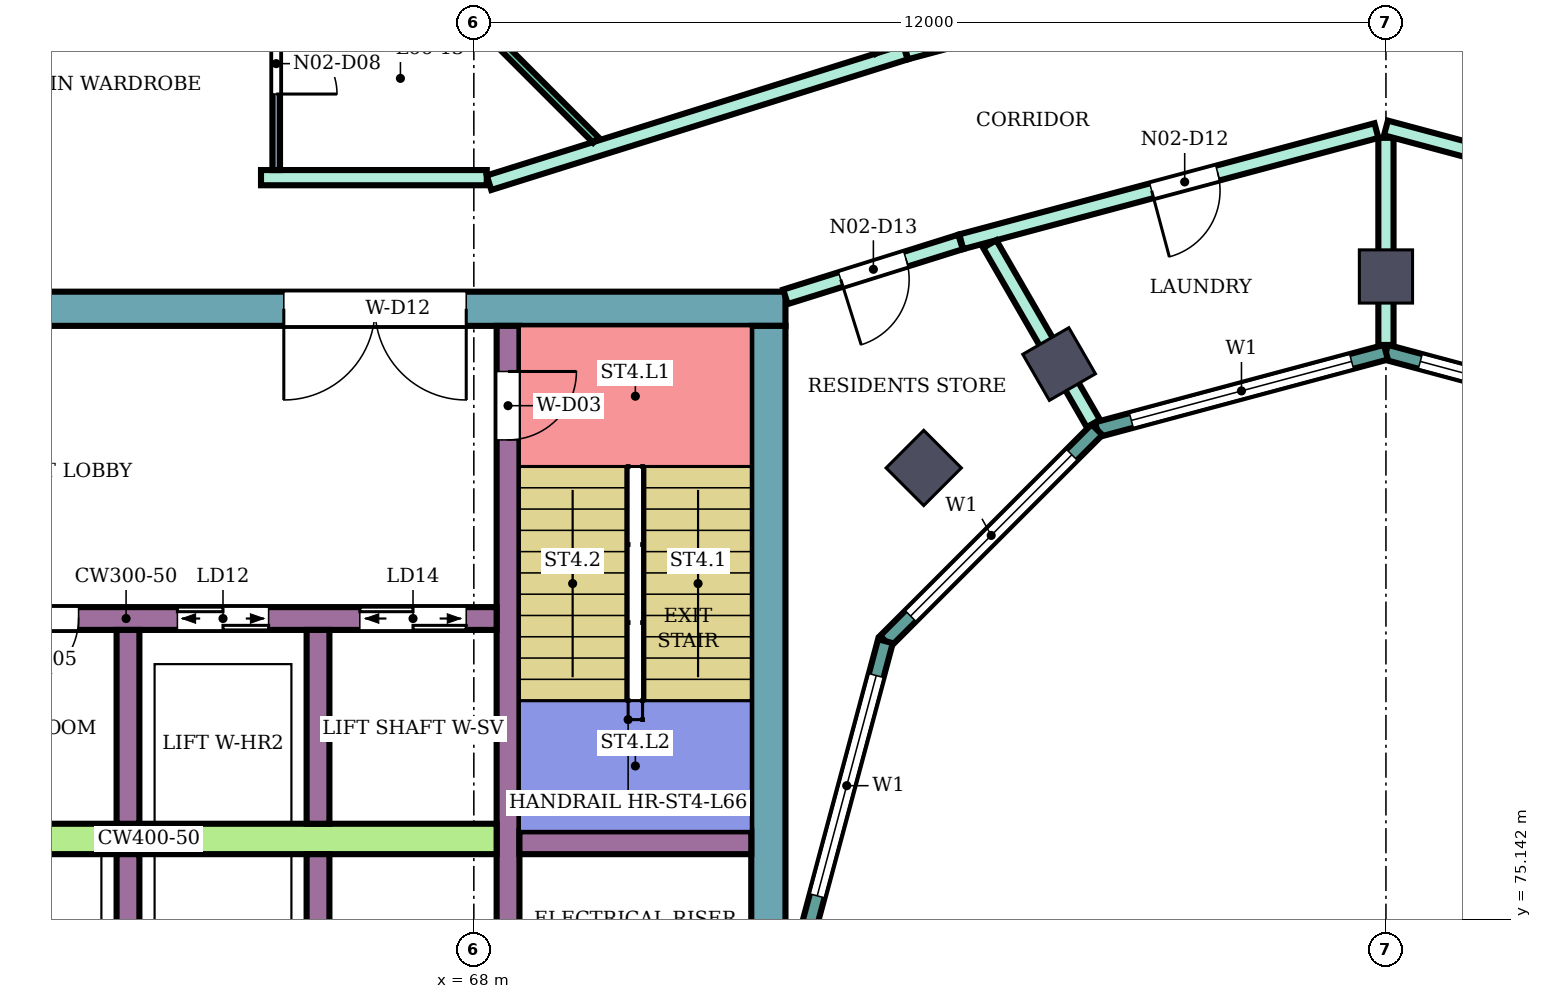
"""IFC4 building model, lengths in metres.
Left out: names, types, materials, properties, quantities, classifications, styles, units other than length and angle.
Written with IfcOpenShell. Run it as: python <this file> out.ifc"""

import sys

from ifc_helpers import new_model, si_unit, direction, frame, frame_2d, origin, origin_2d, place, context, subcontext, project, spatial, rectangle, extrude, element, fill, save


model = new_model("IFC4")
c1 = context("Model", 3, precision=1e-05, world=origin(), true_north=direction((0.0, 1.0)))
c2 = subcontext(c1, "Body", "Model", "MODEL_VIEW")
j1 = project(units=[si_unit("LENGTHUNIT", "METRE"), si_unit("PLANEANGLEUNIT", "RADIAN")], contexts=[c1])
p1 = place(None, origin())
s1 = spatial("IfcSite", under=j1, at=p1, CompositionType="ELEMENT")
p2 = place(p1, origin())
s2 = spatial("IfcBuilding", under=s1, at=p2, CompositionType="ELEMENT")
p3 = place(p2, frame((0.0, 0.0, 288.3)))
s3 = spatial("IfcBuildingStorey", under=s2, at=p3, CompositionType="ELEMENT", Elevation=288.3)
for number, where, z_axis, x_axis in (
    (1, (80.0, 83.6, 0.0), (0.0, 0.0, 1.0), (0.0, 1.0, 0.0)),
    (2, (75.7, 82.448, 0.0), (0.0, 0.0, 1.0), (-0.5, 0.866, 0.0)),
    (3, (73.919, 81.081, 0.0), (0.0, 0.0, 1.0), (-0.707, 0.707, 0.0)),
):
    element("IfcColumn", number, at=place(p3, frame(where, z_axis=z_axis, x_axis=x_axis)), inside=s3, PredefinedType="COLUMN", context=c2, shape_type="SweptSolid", body=[
        extrude(rectangle(XDim=0.7, YDim=0.7, at=origin_2d()), origin(), (0.0, 0.0, 1.0), 4.2),
    ])
p4 = place(p3, frame((72.1, 83.175, 0.0), z_axis=(0.0, 0.0, 1.0), x_axis=(-1.0, 0.0, 0.0)))
e4 = element("IfcWall", 4, at=p4, inside=s3, PredefinedType="SHEAR", context=c2, shape_type="SweptSolid", body=[
    extrude(rectangle(XDim=13.55, YDim=0.45, at=frame_2d((6.775, 0.0))), origin(), (0.0, 0.0, 1.0), 3.88),
])
p5 = place(p4, frame((4.2, 0.0, 0.0)))
e5 = element("IfcOpeningElement", 5, at=p5, cuts=e4, PredefinedType="OPENING", context=c2, shape_type="SweptSolid", body=[
    extrude(rectangle(XDim=2.4, YDim=2.4, at=frame_2d((1.2, 1.2))), frame((0.0, 0.235, 0.0), z_axis=(0.0, -1.0, 0.0), x_axis=(1.0, 0.0, 0.0)), (0.0, 0.0, 1.0), 0.47),
])
p6 = place(p3, frame((71.875, 82.95, 0.0), z_axis=(0.0, 0.0, 1.0), x_axis=(0.0, -1.0, 0.0)))
e6 = element("IfcWall", 6, at=p6, inside=s3, PredefinedType="SHEAR", context=c2, shape_type="SweptSolid", body=[
    extrude(rectangle(XDim=7.95, YDim=0.45, at=frame_2d((3.975, 0.0))), origin(), (0.0, 0.0, 1.0), 3.88),
])
p7 = place(p3, frame((68.45, 82.95, 0.0), z_axis=(0.0, 0.0, 1.0), x_axis=(0.0, -1.0, 0.0)))
e7 = element("IfcWall", 7, at=p7, inside=s3, PredefinedType="SHEAR", context=c2, shape_type="SweptSolid", body=[
    extrude(rectangle(XDim=7.95, YDim=0.3, at=frame_2d((3.975, 0.0))), origin(), (0.0, 0.0, 1.0), 3.88),
])
p8 = place(p7, frame((0.6, 0.0, 0.0)))
e8 = element("IfcOpeningElement", 8, at=p8, cuts=e7, PredefinedType="OPENING", context=c2, shape_type="SweptSolid", body=[
    extrude(rectangle(XDim=0.9, YDim=2.1, at=frame_2d((0.45, 1.05))), frame((0.0, 0.16, 0.0), z_axis=(0.0, -1.0, 0.0), x_axis=(1.0, 0.0, 0.0)), (0.0, 0.0, 1.0), 0.32),
])
p9 = place(p3, frame((71.65, 76.15, 0.0), z_axis=(0.0, 0.0, 1.0), x_axis=(-1.0, 0.0, 0.0)))
e9 = element("IfcWall", 9, at=p9, inside=s3, PredefinedType="SHEAR", context=c2, shape_type="SweptSolid", body=[
    extrude(rectangle(XDim=3.05, YDim=0.3, at=frame_2d((1.525, 0.0))), origin(), (0.0, 0.0, 1.0), 3.88),
])
p10 = place(p3, frame((68.3, 76.2, 0.0), z_axis=(0.0, 0.0, 1.0), x_axis=(-1.0, 0.0, 0.0)))
e10 = element("IfcWall", 10, at=p10, inside=s3, PredefinedType="SHEAR", context=c2, shape_type="SweptSolid", body=[
    extrude(rectangle(XDim=9.75, YDim=0.4, at=frame_2d((4.875, 0.0))), origin(), (0.0, 0.0, 1.0), 3.88),
])
p11 = place(p3, frame((68.3, 79.1, 0.0), z_axis=(0.0, 0.0, 1.0), x_axis=(-1.0, 0.0, 0.0)))
e11 = element("IfcWall", 11, at=p11, inside=s3, PredefinedType="SHEAR", context=c2, shape_type="SweptSolid", body=[
    extrude(rectangle(XDim=9.75, YDim=0.3, at=frame_2d((4.875, 0.0))), origin(), (0.0, 0.0, 1.0), 3.88),
])
p12 = place(p11, frame((0.4, 0.0, 0.0)))
e12 = element("IfcOpeningElement", 12, at=p12, cuts=e11, PredefinedType="OPENING", context=c2, shape_type="SweptSolid", body=[
    extrude(rectangle(XDim=1.4, YDim=2.1, at=frame_2d((0.7, 1.05))), frame((0.0, 0.16, 0.0), z_axis=(0.0, -1.0, 0.0), x_axis=(1.0, 0.0, 0.0)), (0.0, 0.0, 1.0), 0.32),
])
p13 = place(p11, frame((3.0, 0.0, 0.0)))
e13 = element("IfcOpeningElement", 13, at=p13, cuts=e11, PredefinedType="OPENING", context=c2, shape_type="SweptSolid", body=[
    extrude(rectangle(XDim=1.2, YDim=2.1, at=frame_2d((0.6, 1.05))), frame((0.0, 0.16, 0.0), z_axis=(0.0, -1.0, 0.0), x_axis=(1.0, 0.0, 0.0)), (0.0, 0.0, 1.0), 0.32),
])
p14 = place(p11, frame((5.5, 0.0, 0.0)))
e14 = element("IfcOpeningElement", 14, at=p14, cuts=e11, PredefinedType="OPENING", context=c2, shape_type="SweptSolid", body=[
    extrude(rectangle(XDim=0.9, YDim=2.1, at=frame_2d((0.45, 1.05))), frame((0.0, 0.16, 0.0), z_axis=(0.0, -1.0, 0.0), x_axis=(1.0, 0.0, 0.0)), (0.0, 0.0, 1.0), 0.32),
])
p15 = place(p11, frame((7.875, 0.0, 0.0)))
e15 = element("IfcOpeningElement", 15, at=p15, cuts=e11, PredefinedType="OPENING", context=c2, shape_type="SweptSolid", body=[
    extrude(rectangle(XDim=0.9, YDim=2.1, at=frame_2d((0.45, 1.05))), frame((0.0, 0.16, 0.0), z_axis=(0.0, -1.0, 0.0), x_axis=(1.0, 0.0, 0.0)), (0.0, 0.0, 1.0), 0.32),
])
for number, where, z_axis, x_axis in (
    (16, (65.95, 76.0, 0.0), (0.0, 0.0, 1.0), (0.0, -1.0, 0.0)),
    (17, (63.45, 76.0, 0.0), (0.0, 0.0, 1.0), (0.0, -1.0, 0.0)),
    (18, (65.95, 78.95, 0.0), (0.0, 0.0, 1.0), (0.0, -1.0, 0.0)),
    (19, (63.45, 78.95, 0.0), (0.0, 0.0, 1.0), (0.0, -1.0, 0.0)),
):
    element("IfcWall", number, at=place(p3, frame(where, z_axis=z_axis, x_axis=x_axis)), inside=s3, PredefinedType="SHEAR", context=c2, shape_type="SweptSolid", body=[
        extrude(rectangle(XDim=2.55, YDim=0.3, at=frame_2d((1.275, 0.0))), origin(), (0.0, 0.0, 1.0), 3.88),
    ])
p16 = place(p3, frame((83.802, 81.585, 0.0), z_axis=(0.0, 0.0, 1.0), x_axis=(-0.965933654434, 0.258789828301, 0.0)))
e20 = element("IfcWall", 20, at=p16, inside=s3, PredefinedType="NOTDEFINED", context=c2, shape_type="SweptSolid", body=[
    extrude(rectangle(XDim=3.936, YDim=0.2, at=frame_2d((1.968, 0.0))), origin(), (0.0, 0.0, 1.0), 4.2),
])
p17 = place(p16, frame((0.468, 0.0, 0.9)))
e21 = element("IfcOpeningElement", 21, at=p17, cuts=e20, PredefinedType="OPENING", context=c2, shape_type="SweptSolid", body=[
    extrude(rectangle(XDim=3.0, YDim=2.3, at=frame_2d((1.5, 1.15))), frame((0.0, 0.11, 0.0), z_axis=(0.0, -1.0, 0.0), x_axis=(1.0, 0.0, 0.0)), (0.0, 0.0, 1.0), 0.22),
])
p18 = place(p3, frame((80.0, 82.604, 0.0), z_axis=(0.0, 0.0, 1.0), x_axis=(-0.965933654434, -0.258789828301, 0.0)))
e22 = element("IfcWall", 22, at=p18, inside=s3, PredefinedType="NOTDEFINED", context=c2, shape_type="SweptSolid", body=[
    extrude(rectangle(XDim=3.936, YDim=0.2, at=frame_2d((1.968, 0.0))), origin(), (0.0, 0.0, 1.0), 4.2),
])
p19 = place(p18, frame((0.468, 0.0, 0.9)))
e23 = element("IfcOpeningElement", 23, at=p19, cuts=e22, PredefinedType="OPENING", context=c2, shape_type="SweptSolid", body=[
    extrude(rectangle(XDim=3.0, YDim=2.3, at=frame_2d((1.5, 1.15))), frame((0.0, 0.11, 0.0), z_axis=(0.0, -1.0, 0.0), x_axis=(1.0, 0.0, 0.0)), (0.0, 0.0, 1.0), 0.22),
])
p20 = place(p3, frame((76.198, 81.585, 0.0), z_axis=(0.0, 0.0, 1.0), x_axis=(-0.707106781187, -0.707106781187, 0.0)))
e24 = element("IfcWall", 24, at=p20, inside=s3, PredefinedType="NOTDEFINED", context=c2, shape_type="SweptSolid", body=[
    extrude(rectangle(XDim=3.936, YDim=0.2, at=frame_2d((1.968, 0.0))), origin(), (0.0, 0.0, 1.0), 4.2),
])
p21 = place(p20, frame((0.468, 0.0, 0.9)))
e25 = element("IfcOpeningElement", 25, at=p21, cuts=e24, PredefinedType="OPENING", context=c2, shape_type="SweptSolid", body=[
    extrude(rectangle(XDim=3.0, YDim=2.3, at=frame_2d((1.5, 1.15))), frame((0.0, 0.11, 0.0), z_axis=(0.0, -1.0, 0.0), x_axis=(1.0, 0.0, 0.0)), (0.0, 0.0, 1.0), 0.22),
])
p22 = place(p3, frame((73.415, 78.802, 0.0), z_axis=(0.0, 0.0, 1.0), x_axis=(-0.258789828301, -0.965933654434, 0.0)))
e26 = element("IfcWall", 26, at=p22, inside=s3, PredefinedType="NOTDEFINED", context=c2, shape_type="SweptSolid", body=[
    extrude(rectangle(XDim=3.936, YDim=0.2, at=frame_2d((1.968, 0.0))), origin(), (0.0, 0.0, 1.0), 4.2),
])
p23 = place(p22, frame((0.468, 0.0, 0.9)))
e27 = element("IfcOpeningElement", 27, at=p23, cuts=e26, PredefinedType="OPENING", context=c2, shape_type="SweptSolid", body=[
    extrude(rectangle(XDim=3.0, YDim=2.3, at=frame_2d((1.5, 1.15))), frame((0.0, 0.11, 0.0), z_axis=(0.0, -1.0, 0.0), x_axis=(1.0, 0.0, 0.0)), (0.0, 0.0, 1.0), 0.22),
])
p24 = place(p3, frame((65.2, 84.9, 0.0), z_axis=(0.0, 0.0, 1.0), x_axis=(1.0, 0.0, 0.0)))
e28 = element("IfcWall", 28, at=p24, inside=s3, PredefinedType="PARTITIONING", context=c2, shape_type="SweptSolid", body=[
    extrude(rectangle(XDim=2.97, YDim=0.2, at=frame_2d((1.485, 0.0))), origin(), (0.0, 0.0, 1.0), 3.75),
])
p25 = place(p3, frame((68.2, 84.833, 0.0), z_axis=(0.0, 0.0, 1.0), x_axis=(0.954191968402, 0.299195065863, 0.0)))
e29 = element("IfcWall", 29, at=p25, inside=s3, PredefinedType="PARTITIONING", context=c2, shape_type="SweptSolid", body=[
    extrude(rectangle(XDim=5.74, YDim=0.2, at=frame_2d((2.87, 0.0))), origin(), (0.0, 0.0, 1.0), 3.75),
])
p26 = place(p3, frame((72.1, 83.332, 0.0), z_axis=(0.0, 0.0, 1.0), x_axis=(0.954233106619, 0.299063836383, 0.0)))
e30 = element("IfcWall", 30, at=p26, inside=s3, PredefinedType="PARTITIONING", context=c2, shape_type="SweptSolid", body=[
    extrude(rectangle(XDim=2.414, YDim=0.2, at=frame_2d((1.207, 0.0))), origin(), (0.0, 0.0, 1.0), 3.75),
])
p27 = place(p26, frame((0.762, 0.0, 0.0)))
e31 = element("IfcOpeningElement", 31, at=p27, cuts=e30, PredefinedType="OPENING", context=c2, shape_type="SweptSolid", body=[
    extrude(rectangle(XDim=0.9, YDim=2.1, at=frame_2d((0.45, 1.05))), frame((0.0, 0.11, 0.0), z_axis=(0.0, -1.0, 0.0), x_axis=(1.0, 0.0, 0.0)), (0.0, 0.0, 1.0), 0.22),
])
p28 = place(p3, frame((73.687, 86.554, 0.0), z_axis=(0.0, 0.0, 1.0), x_axis=(0.96595903825, 0.258695064551, 0.0)))
e32 = element("IfcWall", 32, at=p28, inside=s3, PredefinedType="PARTITIONING", context=c2, shape_type="SweptSolid", body=[
    extrude(rectangle(XDim=6.446, YDim=0.2, at=frame_2d((3.223, 0.0))), origin(), (0.0, 0.0, 1.0), 3.75),
])
p29 = place(p28, frame((4.986, 0.0, 0.0)))
e33 = element("IfcOpeningElement", 33, at=p29, cuts=e32, PredefinedType="OPENING", context=c2, shape_type="SweptSolid", body=[
    extrude(rectangle(XDim=1.0, YDim=2.1, at=frame_2d((0.5, 1.05))), frame((0.0, 0.11, 0.0), z_axis=(0.0, -1.0, 0.0), x_axis=(1.0, 0.0, 0.0)), (0.0, 0.0, 1.0), 0.22),
])
p30 = place(p3, frame((74.413, 84.057, 0.0), z_axis=(0.0, 0.0, 1.0), x_axis=(0.965972135939, 0.258646153246, 0.0)))
e34 = element("IfcWall", 34, at=p30, inside=s3, PredefinedType="PARTITIONING", context=c2, shape_type="SweptSolid", body=[
    extrude(rectangle(XDim=5.654, YDim=0.2, at=frame_2d((2.827, 0.0))), origin(), (0.0, 0.0, 1.0), 3.75),
])
p31 = place(p30, frame((2.593, 0.0, 0.0)))
e35 = element("IfcOpeningElement", 35, at=p31, cuts=e34, PredefinedType="OPENING", context=c2, shape_type="SweptSolid", body=[
    extrude(rectangle(XDim=0.9, YDim=2.1, at=frame_2d((0.45, 1.05))), frame((0.0, 0.11, 0.0), z_axis=(0.0, -1.0, 0.0), x_axis=(1.0, 0.0, 0.0)), (0.0, 0.0, 1.0), 0.22),
])
p32 = place(p3, frame((74.787, 84.027, 0.0), z_axis=(0.0, 0.0, 1.0), x_axis=(0.500079107518, -0.86597972622, 0.0)))
e36 = element("IfcWall", 36, at=p32, inside=s3, PredefinedType="PARTITIONING", context=c2, shape_type="SweptSolid", body=[
    extrude(rectangle(XDim=2.726, YDim=0.2, at=frame_2d((1.363, 0.0))), origin(), (0.0, 0.0, 1.0), 3.75),
])
p33 = place(p3, frame((80.0, 82.699, 0.0), z_axis=(0.0, 0.0, 1.0), x_axis=(0.0, 1.0, 0.0)))
e37 = element("IfcWall", 37, at=p33, inside=s3, PredefinedType="PARTITIONING", context=c2, shape_type="SweptSolid", body=[
    extrude(rectangle(XDim=2.725, YDim=0.2, at=frame_2d((1.363, 0.0))), origin(), (0.0, 0.0, 1.0), 3.75),
])
p34 = place(p3, frame((80.0, 85.554, 0.0), z_axis=(0.0, 0.0, 1.0), x_axis=(0.965928989968, -0.258807237802, 0.0)))
e38 = element("IfcWall", 38, at=p34, inside=s3, PredefinedType="PARTITIONING", context=c2, shape_type="SweptSolid", body=[
    extrude(rectangle(XDim=5.774, YDim=0.2, at=frame_2d((2.887, 0.0))), origin(), (0.0, 0.0, 1.0), 3.75),
])
p35 = place(p34, frame((2.292, 0.0, 0.0)))
e39 = element("IfcOpeningElement", 39, at=p35, cuts=e38, PredefinedType="OPENING", context=c2, shape_type="SweptSolid", body=[
    extrude(rectangle(XDim=0.9, YDim=2.1, at=frame_2d((0.45, 1.05))), frame((0.0, 0.11, 0.0), z_axis=(0.0, -1.0, 0.0), x_axis=(1.0, 0.0, 0.0)), (0.0, 0.0, 1.0), 0.22),
])
p36 = place(p3, frame((80.087, 88.223, 0.0), z_axis=(0.0, 0.0, 1.0), x_axis=(0.965852330757, -0.25909317855, 0.0)))
e40 = element("IfcWall", 40, at=p36, inside=s3, PredefinedType="PARTITIONING", context=c2, shape_type="SweptSolid", body=[
    extrude(rectangle(XDim=6.436, YDim=0.2, at=frame_2d((3.218, 0.0))), origin(), (0.0, 0.0, 1.0), 3.75),
])
p37 = place(p36, frame((2.678, 0.0, 0.0)))
e41 = element("IfcOpeningElement", 41, at=p37, cuts=e40, PredefinedType="OPENING", context=c2, shape_type="SweptSolid", body=[
    extrude(rectangle(XDim=1.0, YDim=2.1, at=frame_2d((0.5, 1.05))), frame((0.0, 0.11, 0.0), z_axis=(0.0, -1.0, 0.0), x_axis=(1.0, 0.0, 0.0)), (0.0, 0.0, 1.0), 0.22),
])
p38 = place(p3, frame((64.656, 90.344, 0.0), z_axis=(0.0, 0.0, 1.0), x_axis=(0.707106781187, -0.707106781187, 0.0)))
e42 = element("IfcWall", 42, at=p38, inside=s3, PredefinedType="PARTITIONING", context=c2, shape_type="SweptSolid", body=[
    extrude(rectangle(XDim=7.0, YDim=0.1, at=frame_2d((3.5, 0.0))), origin(), (0.0, 0.0, 1.0), 2.48),
])
p39 = place(p38, frame((1.613, 0.0, 0.0)))
e43 = element("IfcOpeningElement", 43, at=p39, cuts=e42, PredefinedType="OPENING", context=c2, shape_type="SweptSolid", body=[
    extrude(rectangle(XDim=0.9, YDim=2.1, at=frame_2d((0.45, 1.05))), frame((0.0, 0.06, 0.0), z_axis=(0.0, -1.0, 0.0), x_axis=(1.0, 0.0, 0.0)), (0.0, 0.0, 1.0), 0.12),
])
p40 = place(p3, frame((65.4, 85.0, 0.0), z_axis=(0.0, 0.0, 1.0), x_axis=(0.0, 1.0, 0.0)))
e44 = element("IfcWall", 44, at=p40, inside=s3, PredefinedType="PARTITIONING", context=c2, shape_type="SweptSolid", body=[
    extrude(rectangle(XDim=2.85, YDim=0.1, at=frame_2d((1.425, 0.0))), origin(), (0.0, 0.0, 1.0), 3.75),
])
p41 = place(p40, frame((1.0, 0.0, 0.0)))
e45 = element("IfcOpeningElement", 45, at=p41, cuts=e44, PredefinedType="OPENING", context=c2, shape_type="SweptSolid", body=[
    extrude(rectangle(XDim=0.8, YDim=2.1, at=frame_2d((0.4, 1.05))), frame((0.0, 0.06, 0.0), z_axis=(0.0, -1.0, 0.0), x_axis=(1.0, 0.0, 0.0)), (0.0, 0.0, 1.0), 0.12),
])
p42 = place(p3, frame((67.851, 96.042, 0.0), z_axis=(0.0, 0.0, 1.0), x_axis=(0.499990581918, -0.866030841248, 0.0)))
e46 = element("IfcWall", 46, at=p42, inside=s3, PredefinedType="PARTITIONING", context=c2, shape_type="SweptSolid", body=[
    extrude(rectangle(XDim=10.956, YDim=0.1, at=frame_2d((5.478, 0.0))), origin(), (0.0, 0.0, 1.0), 2.48),
])
p43 = place(p42, frame((2.72, 0.0, 0.0)))
e47 = element("IfcOpeningElement", 47, at=p43, cuts=e46, PredefinedType="OPENING", context=c2, shape_type="SweptSolid", body=[
    extrude(rectangle(XDim=0.9, YDim=2.1, at=frame_2d((0.45, 1.05))), frame((0.0, 0.06, 0.0), z_axis=(0.0, -1.0, 0.0), x_axis=(1.0, 0.0, 0.0)), (0.0, 0.0, 1.0), 0.12),
])
p44 = place(p17, origin())
e48 = element("IfcWindow", 48, at=p44, inside=s3, PartitioningType="SINGLE_PANEL", PredefinedType="WINDOW", context=c2, shape_type="SweptSolid", body=[
    extrude(rectangle(XDim=3.0, YDim=2.3, at=frame_2d((1.5, 1.15))), frame((0.0, 0.03, 0.0), z_axis=(0.0, -1.0, 0.0), x_axis=(1.0, 0.0, 0.0)), (0.0, 0.0, 1.0), 0.06),
])
fill(e21, e48)
p45 = place(p19, origin())
e49 = element("IfcWindow", 49, at=p45, inside=s3, PartitioningType="SINGLE_PANEL", PredefinedType="WINDOW", context=c2, shape_type="SweptSolid", body=[
    extrude(rectangle(XDim=3.0, YDim=2.3, at=frame_2d((1.5, 1.15))), frame((0.0, 0.03, 0.0), z_axis=(0.0, -1.0, 0.0), x_axis=(1.0, 0.0, 0.0)), (0.0, 0.0, 1.0), 0.06),
])
fill(e23, e49)
p46 = place(p21, origin())
e50 = element("IfcWindow", 50, at=p46, inside=s3, PartitioningType="SINGLE_PANEL", PredefinedType="WINDOW", context=c2, shape_type="SweptSolid", body=[
    extrude(rectangle(XDim=3.0, YDim=2.3, at=frame_2d((1.5, 1.15))), frame((0.0, 0.03, 0.0), z_axis=(0.0, -1.0, 0.0), x_axis=(1.0, 0.0, 0.0)), (0.0, 0.0, 1.0), 0.06),
])
fill(e25, e50)
p47 = place(p23, origin())
e51 = element("IfcWindow", 51, at=p47, inside=s3, PartitioningType="SINGLE_PANEL", PredefinedType="WINDOW", context=c2, shape_type="SweptSolid", body=[
    extrude(rectangle(XDim=3.0, YDim=2.3, at=frame_2d((1.5, 1.15))), frame((0.0, 0.03, 0.0), z_axis=(0.0, -1.0, 0.0), x_axis=(1.0, 0.0, 0.0)), (0.0, 0.0, 1.0), 0.06),
])
fill(e27, e51)
p48 = place(p41, frame((0.8, 0.0, 0.0), z_axis=(0.0, 0.0, 1.0), x_axis=(-1.0, 0.0, 0.0)))
e52 = element("IfcDoor", 52, at=p48, inside=s3, OperationType="SINGLE_SWING_RIGHT", PredefinedType="DOOR", context=c2, shape_type="SweptSolid", body=[
    extrude(rectangle(XDim=0.8, YDim=2.1, at=frame_2d((0.4, 1.05))), frame((0.0, 0.025, 0.0), z_axis=(0.0, -1.0, 0.0), x_axis=(1.0, 0.0, 0.0)), (0.0, 0.0, 1.0), 0.05),
])
fill(e45, e52)
p49 = place(p31, frame((0.9, 0.0, 0.0), z_axis=(0.0, 0.0, 1.0), x_axis=(-1.0, 0.0, 0.0)))
e53 = element("IfcDoor", 53, at=p49, inside=s3, OperationType="SINGLE_SWING_RIGHT", PredefinedType="DOOR", context=c2, shape_type="SweptSolid", body=[
    extrude(rectangle(XDim=0.9, YDim=2.1, at=frame_2d((0.45, 1.05))), frame((0.0, 0.025, 0.0), z_axis=(0.0, -1.0, 0.0), x_axis=(1.0, 0.0, 0.0)), (0.0, 0.0, 1.0), 0.05),
])
fill(e35, e53)
p50 = place(p27, frame((0.9, 0.0, 0.0), z_axis=(0.0, 0.0, 1.0), x_axis=(-1.0, 0.0, 0.0)))
e54 = element("IfcDoor", 54, at=p50, inside=s3, OperationType="SINGLE_SWING_RIGHT", PredefinedType="DOOR", context=c2, shape_type="SweptSolid", body=[
    extrude(rectangle(XDim=0.9, YDim=2.1, at=frame_2d((0.45, 1.05))), frame((0.0, 0.025, 0.0), z_axis=(0.0, -1.0, 0.0), x_axis=(1.0, 0.0, 0.0)), (0.0, 0.0, 1.0), 0.05),
])
fill(e31, e54)
p51 = place(p8, origin())
e55 = element("IfcDoor", 55, at=p51, inside=s3, OperationType="SINGLE_SWING_LEFT", PredefinedType="DOOR", context=c2, shape_type="SweptSolid", body=[
    extrude(rectangle(XDim=0.9, YDim=2.1, at=frame_2d((0.45, 1.05))), frame((0.0, 0.025, 0.0), z_axis=(0.0, -1.0, 0.0), x_axis=(1.0, 0.0, 0.0)), (0.0, 0.0, 1.0), 0.05),
])
fill(e8, e55)
p52 = place(p12, origin())
e56 = element("IfcDoor", 56, at=p52, inside=s3, OperationType="DOUBLE_DOOR_SLIDING", PredefinedType="DOOR", context=c2, shape_type="SweptSolid", body=[
    extrude(rectangle(XDim=1.4, YDim=2.1, at=frame_2d((0.7, 1.05))), frame((0.0, 0.025, 0.0), z_axis=(0.0, -1.0, 0.0), x_axis=(1.0, 0.0, 0.0)), (0.0, 0.0, 1.0), 0.05),
])
fill(e12, e56)
p53 = place(p13, origin())
e57 = element("IfcDoor", 57, at=p53, inside=s3, OperationType="DOUBLE_DOOR_SLIDING", PredefinedType="DOOR", context=c2, shape_type="SweptSolid", body=[
    extrude(rectangle(XDim=1.2, YDim=2.1, at=frame_2d((0.6, 1.05))), frame((0.0, 0.025, 0.0), z_axis=(0.0, -1.0, 0.0), x_axis=(1.0, 0.0, 0.0)), (0.0, 0.0, 1.0), 0.05),
])
fill(e13, e57)
p54 = place(p14, origin())
e58 = element("IfcDoor", 58, at=p54, inside=s3, OperationType="SINGLE_SWING_RIGHT", PredefinedType="DOOR", context=c2, shape_type="SweptSolid", body=[
    extrude(rectangle(XDim=0.9, YDim=2.1, at=frame_2d((0.45, 1.05))), frame((0.0, 0.025, 0.0), z_axis=(0.0, -1.0, 0.0), x_axis=(1.0, 0.0, 0.0)), (0.0, 0.0, 1.0), 0.05),
])
fill(e14, e58)
p55 = place(p5, origin())
e59 = element("IfcDoor", 59, at=p55, inside=s3, OperationType="DOUBLE_DOOR_SINGLE_SWING", PredefinedType="DOOR", context=c2, shape_type="SweptSolid", body=[
    extrude(rectangle(XDim=2.4, YDim=2.4, at=frame_2d((1.2, 1.2))), frame((0.0, 0.025, 0.0), z_axis=(0.0, -1.0, 0.0), x_axis=(1.0, 0.0, 0.0)), (0.0, 0.0, 1.0), 0.05),
])
fill(e5, e59)
save(model, sys.argv[1])
